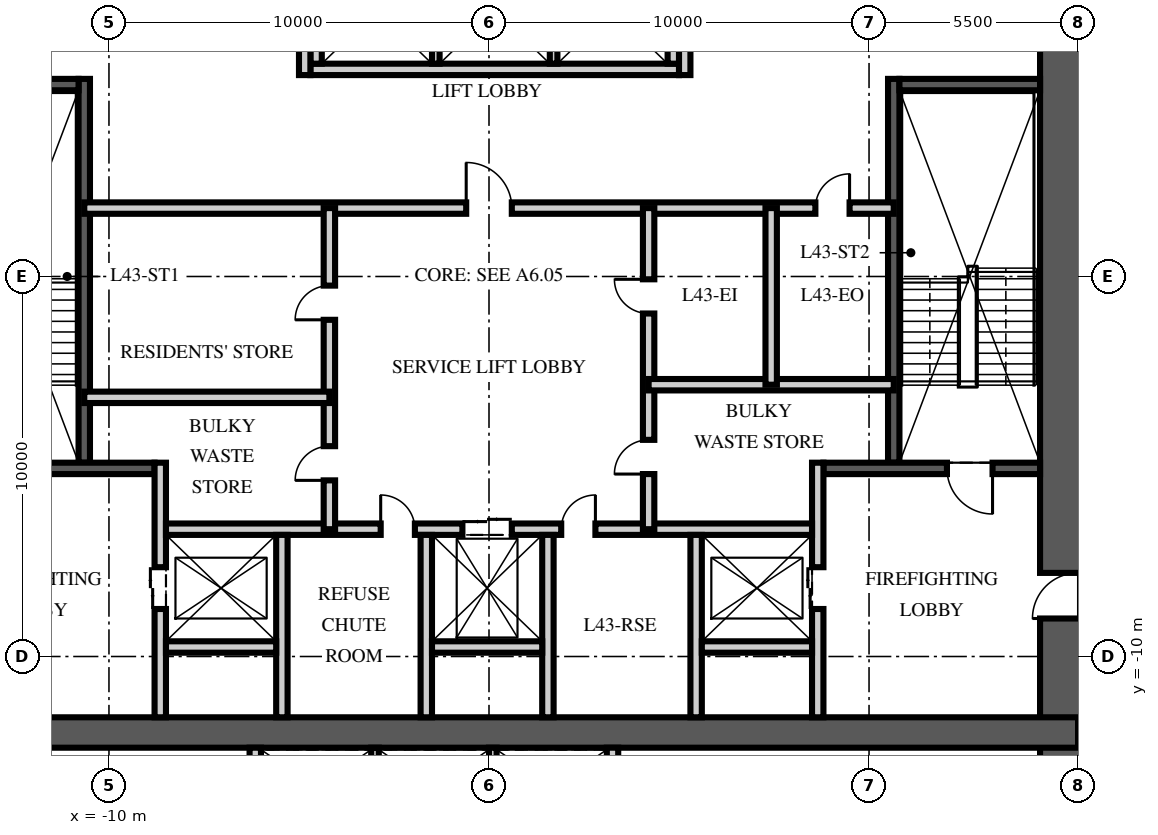
"""IFC4 building model, lengths in metres.
Left out: names, types, materials, properties, quantities, classifications, styles, units other than length and angle.
Written with IfcOpenShell. Run it as: python <this file> out.ifc"""

import sys

from ifc_helpers import new_model, si_unit, direction, frame, frame_2d, origin, place, context, subcontext, project, spatial, rectangle, extrude, element, fill, save


model = new_model("IFC4")
c1 = context("Model", 3, precision=1e-05, world=origin(), true_north=direction((0.0, 1.0)))
c2 = subcontext(c1, "Body", "Model", "MODEL_VIEW")
j1 = project(units=[si_unit("LENGTHUNIT", "METRE"), si_unit("PLANEANGLEUNIT", "RADIAN")], contexts=[c1])
p1 = place(None, origin())
s1 = spatial("IfcSite", under=j1, at=p1, CompositionType="ELEMENT")
p2 = place(p1, origin())
s2 = spatial("IfcBuilding", under=s1, at=p2, CompositionType="ELEMENT")
p3 = place(p2, frame((0.0, 0.0, 171.0)))
s3 = spatial("IfcBuildingStorey", under=s2, at=p3, CompositionType="ELEMENT", Elevation=171.0)
p4 = place(p3, frame((15.5, -15.5, -0.25), z_axis=(0.0, 0.0, 1.0), x_axis=(0.0, 1.0, 0.0)))
e1 = element("IfcWall", 1, at=p4, inside=s3, PredefinedType="SHEAR", context=c2, shape_type="SweptSolid", body=[
    extrude(rectangle(XDim=31.0, YDim=2.0, at=frame_2d((15.5, 0.0))), origin(), (0.0, 0.0, 1.0), 3.75),
])
p5 = place(p4, frame((6.5, 0.0, 0.25)))
e2 = element("IfcOpeningElement", 2, at=p5, cuts=e1, PredefinedType="OPENING", context=c2, shape_type="SweptSolid", body=[
    extrude(rectangle(XDim=1.2, YDim=2.1, at=frame_2d((0.6, 1.05))), frame((0.0, 1.01, 0.0), z_axis=(0.0, -1.0, 0.0), x_axis=(1.0, 0.0, 0.0)), (0.0, 0.0, 1.0), 2.02),
])
p6 = place(p4, frame((23.0, 0.0, 0.25)))
e3 = element("IfcOpeningElement", 3, at=p6, cuts=e1, PredefinedType="OPENING", context=c2, shape_type="SweptSolid", body=[
    extrude(rectangle(XDim=1.8, YDim=2.1, at=frame_2d((0.9, 1.05))), frame((0.0, 1.01, 0.0), z_axis=(0.0, -1.0, 0.0), x_axis=(1.0, 0.0, 0.0)), (0.0, 0.0, 1.0), 2.02),
])
p7 = place(p3, frame((-15.5, -12.0, -0.25), z_axis=(0.0, 0.0, 1.0), x_axis=(1.0, 0.0, 0.0)))
e4 = element("IfcWall", 4, at=p7, inside=s3, PredefinedType="SHEAR", context=c2, shape_type="SweptSolid", body=[
    extrude(rectangle(XDim=31.0, YDim=0.8, at=frame_2d((15.5, 0.0))), origin(), (0.0, 0.0, 1.0), 3.75),
])
p8 = place(p3, frame((-10.65, -4.9, 0.0), z_axis=(0.0, 0.0, 1.0), x_axis=(0.0, 1.0, 0.0)))
e5 = element("IfcWall", 5, at=p8, inside=s3, PredefinedType="SOLIDWALL", context=c2, shape_type="SweptSolid", body=[
    extrude(rectangle(XDim=10.1, YDim=0.3, at=frame_2d((5.05, 0.0))), origin(), (0.0, 0.0, 1.0), 3.5),
])
p9 = place(p3, frame((-14.5, -5.05, 0.0), z_axis=(0.0, 0.0, 1.0), x_axis=(1.0, 0.0, 0.0)))
e6 = element("IfcWall", 6, at=p9, inside=s3, PredefinedType="SOLIDWALL", context=c2, shape_type="SweptSolid", body=[
    extrude(rectangle(XDim=5.7, YDim=0.3, at=frame_2d((2.85, 0.0))), origin(), (0.0, 0.0, 1.0), 3.5),
])
p10 = place(p9, frame((1.25, 0.0, 0.0)))
e7 = element("IfcOpeningElement", 7, at=p10, cuts=e6, PredefinedType="OPENING", context=c2, shape_type="SweptSolid", body=[
    extrude(rectangle(XDim=1.2, YDim=2.1, at=frame_2d((0.6, 1.05))), frame((0.0, 0.16, 0.0), z_axis=(0.0, -1.0, 0.0), x_axis=(1.0, 0.0, 0.0)), (0.0, 0.0, 1.0), 0.32),
])
p11 = place(p3, frame((-14.5, 5.05, 0.0), z_axis=(0.0, 0.0, 1.0), x_axis=(1.0, 0.0, 0.0)))
e8 = element("IfcWall", 8, at=p11, inside=s3, PredefinedType="SOLIDWALL", context=c2, shape_type="SweptSolid", body=[
    extrude(rectangle(XDim=3.7, YDim=0.3, at=frame_2d((1.85, 0.0))), origin(), (0.0, 0.0, 1.0), 3.5),
])
p12 = place(p3, frame((-8.65, -11.6, 0.0), z_axis=(0.0, 0.0, 1.0), x_axis=(0.0, 1.0, 0.0)))
e9 = element("IfcWall", 9, at=p12, inside=s3, PredefinedType="PARTITIONING", context=c2, shape_type="SweptSolid", body=[
    extrude(rectangle(XDim=6.7, YDim=0.3, at=frame_2d((3.35, 0.0))), origin(), (0.0, 0.0, 1.0), 3.5),
])
p13 = place(p12, frame((2.85, 0.0, 0.0)))
e10 = element("IfcOpeningElement", 10, at=p13, cuts=e9, PredefinedType="OPENING", context=c2, shape_type="SweptSolid", body=[
    extrude(rectangle(XDim=1.1, YDim=2.1, at=frame_2d((0.55, 1.05))), frame((0.0, 0.16, 0.0), z_axis=(0.0, -1.0, 0.0), x_axis=(1.0, 0.0, 0.0)), (0.0, 0.0, 1.0), 0.32),
])
p14 = place(p3, frame((10.65, -4.9, 0.0), z_axis=(0.0, 0.0, 1.0), x_axis=(0.0, 1.0, 0.0)))
e11 = element("IfcWall", 11, at=p14, inside=s3, PredefinedType="SOLIDWALL", context=c2, shape_type="SweptSolid", body=[
    extrude(rectangle(XDim=10.1, YDim=0.3, at=frame_2d((5.05, 0.0))), origin(), (0.0, 0.0, 1.0), 3.5),
])
p15 = place(p3, frame((14.5, -5.05, 0.0), z_axis=(0.0, 0.0, 1.0), x_axis=(-1.0, 0.0, 0.0)))
e12 = element("IfcWall", 12, at=p15, inside=s3, PredefinedType="SOLIDWALL", context=c2, shape_type="SweptSolid", body=[
    extrude(rectangle(XDim=5.7, YDim=0.3, at=frame_2d((2.85, 0.0))), origin(), (0.0, 0.0, 1.0), 3.5),
])
p16 = place(p15, frame((1.25, 0.0, 0.0)))
e13 = element("IfcOpeningElement", 13, at=p16, cuts=e12, PredefinedType="OPENING", context=c2, shape_type="SweptSolid", body=[
    extrude(rectangle(XDim=1.2, YDim=2.1, at=frame_2d((0.6, 1.05))), frame((0.0, 0.16, 0.0), z_axis=(0.0, -1.0, 0.0), x_axis=(1.0, 0.0, 0.0)), (0.0, 0.0, 1.0), 0.32),
])
p17 = place(p3, frame((14.5, 5.05, 0.0), z_axis=(0.0, 0.0, 1.0), x_axis=(-1.0, 0.0, 0.0)))
e14 = element("IfcWall", 14, at=p17, inside=s3, PredefinedType="SOLIDWALL", context=c2, shape_type="SweptSolid", body=[
    extrude(rectangle(XDim=3.7, YDim=0.3, at=frame_2d((1.85, 0.0))), origin(), (0.0, 0.0, 1.0), 3.5),
])
p18 = place(p3, frame((8.65, -11.6, 0.0), z_axis=(0.0, 0.0, 1.0), x_axis=(0.0, 1.0, 0.0)))
e15 = element("IfcWall", 15, at=p18, inside=s3, PredefinedType="PARTITIONING", context=c2, shape_type="SweptSolid", body=[
    extrude(rectangle(XDim=6.7, YDim=0.3, at=frame_2d((3.35, 0.0))), origin(), (0.0, 0.0, 1.0), 3.5),
])
p19 = place(p18, frame((2.85, 0.0, 0.0)))
e16 = element("IfcOpeningElement", 16, at=p19, cuts=e15, PredefinedType="OPENING", context=c2, shape_type="SweptSolid", body=[
    extrude(rectangle(XDim=1.1, YDim=2.1, at=frame_2d((0.55, 1.05))), frame((0.0, 0.16, 0.0), z_axis=(0.0, -1.0, 0.0), x_axis=(1.0, 0.0, 0.0)), (0.0, 0.0, 1.0), 0.32),
])
p20 = place(p3, frame((-8.5, -6.65, 0.0), z_axis=(0.0, 0.0, 1.0), x_axis=(1.0, 0.0, 0.0)))
e17 = element("IfcWall", 17, at=p20, inside=s3, PredefinedType="PARTITIONING", context=c2, shape_type="SweptSolid", body=[
    extrude(rectangle(XDim=17.0, YDim=0.3, at=frame_2d((8.5, 0.0))), origin(), (0.0, 0.0, 1.0), 3.5),
])
p21 = place(p20, frame((7.8, 0.0, 0.0)))
e18 = element("IfcOpeningElement", 18, at=p21, cuts=e17, PredefinedType="OPENING", context=c2, shape_type="SweptSolid", body=[
    extrude(rectangle(XDim=1.3, YDim=2.4, at=frame_2d((0.65, 1.2))), frame((0.0, 0.16, 0.0), z_axis=(0.0, -1.0, 0.0), x_axis=(1.0, 0.0, 0.0)), (0.0, 0.0, 1.0), 0.32),
])
p22 = place(p20, frame((5.65, 0.0, 0.0)))
e19 = element("IfcOpeningElement", 19, at=p22, cuts=e17, PredefinedType="OPENING", context=c2, shape_type="SweptSolid", body=[
    extrude(rectangle(XDim=0.9, YDim=2.1, at=frame_2d((0.45, 1.05))), frame((0.0, 0.16, 0.0), z_axis=(0.0, -1.0, 0.0), x_axis=(1.0, 0.0, 0.0)), (0.0, 0.0, 1.0), 0.32),
])
p23 = place(p20, frame((10.4, 0.0, 0.0)))
e20 = element("IfcOpeningElement", 20, at=p23, cuts=e17, PredefinedType="OPENING", context=c2, shape_type="SweptSolid", body=[
    extrude(rectangle(XDim=0.9, YDim=2.1, at=frame_2d((0.45, 1.05))), frame((0.0, 0.16, 0.0), z_axis=(0.0, -1.0, 0.0), x_axis=(1.0, 0.0, 0.0)), (0.0, 0.0, 1.0), 0.32),
])
for number, where, z_axis, x_axis in (
    (21, (-5.45, -11.6, 0.0), (0.0, 0.0, 1.0), (0.0, 1.0, 0.0)),
    (22, (-1.65, -11.6, 0.0), (0.0, 0.0, 1.0), (0.0, 1.0, 0.0)),
    (23, (1.55, -11.6, 0.0), (0.0, 0.0, 1.0), (0.0, 1.0, 0.0)),
    (24, (5.45, -11.6, 0.0), (0.0, 0.0, 1.0), (0.0, 1.0, 0.0)),
):
    element("IfcWall", number, at=place(p3, frame(where, z_axis=z_axis, x_axis=x_axis)), inside=s3, PredefinedType="PARTITIONING", context=c2, shape_type="SweptSolid", body=[
        extrude(rectangle(XDim=4.8, YDim=0.3, at=frame_2d((2.4, 0.0))), origin(), (0.0, 0.0, 1.0), 3.5),
    ])
for number, where, z_axis, x_axis in (
    (25, (-8.5, -9.75, 0.0), (0.0, 0.0, 1.0), (1.0, 0.0, 0.0)),
    (26, (-1.5, -9.75, 0.0), (0.0, 0.0, 1.0), (1.0, 0.0, 0.0)),
    (27, (5.6, -9.75, 0.0), (0.0, 0.0, 1.0), (1.0, 0.0, 0.0)),
):
    element("IfcWall", number, at=place(p3, frame(where, z_axis=z_axis, x_axis=x_axis)), inside=s3, PredefinedType="PARTITIONING", context=c2, shape_type="SweptSolid", body=[
        extrude(rectangle(XDim=2.9, YDim=0.3, at=frame_2d((1.45, 0.0))), origin(), (0.0, 0.0, 1.0), 3.5),
    ])
p24 = place(p3, frame((-4.7, 5.45, 0.0), z_axis=(0.0, 0.0, 1.0), x_axis=(1.0, 0.0, 0.0)))
e28 = element("IfcWall", 28, at=p24, inside=s3, PredefinedType="PARTITIONING", context=c2, shape_type="SweptSolid", body=[
    extrude(rectangle(XDim=9.7, YDim=0.3, at=frame_2d((4.85, 0.0))), origin(), (0.0, 0.0, 1.0), 3.5),
])
for number, where, z_axis, x_axis in (
    (29, (-4.55, 5.6, 0.0), (0.0, 0.0, 1.0), (0.0, 1.0, 0.0)),
    (30, (4.85, 5.6, 0.0), (0.0, 0.0, 1.0), (0.0, 1.0, 0.0)),
):
    element("IfcWall", number, at=place(p3, frame(where, z_axis=z_axis, x_axis=x_axis)), inside=s3, PredefinedType="PARTITIONING", context=c2, shape_type="SweptSolid", body=[
        extrude(rectangle(XDim=2.8, YDim=0.3, at=frame_2d((1.4, 0.0))), origin(), (0.0, 0.0, 1.0), 3.5),
    ])
for number, where, z_axis, x_axis in (
    (31, (-1.4, 5.6, 0.0), (0.0, 0.0, 1.0), (0.0, 1.0, 0.0)),
    (32, (1.7, 5.6, 0.0), (0.0, 0.0, 1.0), (0.0, 1.0, 0.0)),
):
    element("IfcWall", number, at=place(p3, frame(where, z_axis=z_axis, x_axis=x_axis)), inside=s3, PredefinedType="PARTITIONING", context=c2, shape_type="SweptSolid", body=[
        extrude(rectangle(XDim=2.8, YDim=0.2, at=frame_2d((1.4, 0.0))), origin(), (0.0, 0.0, 1.0), 3.5),
    ])
for number, where, z_axis, x_axis in (
    (33, (-6.15, -14.5, 0.0), (0.0, 0.0, 1.0), (0.0, 1.0, 0.0)),
    (34, (3.25, -14.5, 0.0), (0.0, 0.0, 1.0), (0.0, 1.0, 0.0)),
):
    element("IfcWall", number, at=place(p3, frame(where, z_axis=z_axis, x_axis=x_axis)), inside=s3, PredefinedType="PARTITIONING", context=c2, shape_type="SweptSolid", body=[
        extrude(rectangle(XDim=2.1, YDim=0.3, at=frame_2d((1.05, 0.0))), origin(), (0.0, 0.0, 1.0), 3.5),
    ])
for number, where, z_axis, x_axis in (
    (35, (-3.0, -14.5, 0.0), (0.0, 0.0, 1.0), (0.0, 1.0, 0.0)),
    (36, (0.1, -14.5, 0.0), (0.0, 0.0, 1.0), (0.0, 1.0, 0.0)),
):
    element("IfcWall", number, at=place(p3, frame(where, z_axis=z_axis, x_axis=x_axis)), inside=s3, PredefinedType="PARTITIONING", context=c2, shape_type="SweptSolid", body=[
        extrude(rectangle(XDim=2.1, YDim=0.2, at=frame_2d((1.05, 0.0))), origin(), (0.0, 0.0, 1.0), 3.5),
    ])
p25 = place(p3, frame((-10.65, 1.8, 0.0), z_axis=(0.0, 0.0, 1.0), x_axis=(1.0, 0.0, 0.0)))
e37 = element("IfcWall", 37, at=p25, inside=s3, PredefinedType="PARTITIONING", context=c2, shape_type="SweptSolid", body=[
    extrude(rectangle(XDim=21.3, YDim=0.3, at=frame_2d((10.65, 0.0))), origin(), (0.0, 0.0, 1.0), 3.5),
])
p26 = place(p25, frame((10.05, 0.0, 0.0)))
e38 = element("IfcOpeningElement", 38, at=p26, cuts=e37, PredefinedType="OPENING", context=c2, shape_type="SweptSolid", body=[
    extrude(rectangle(XDim=1.2, YDim=2.1, at=frame_2d((0.6, 1.05))), frame((0.0, 0.16, 0.0), z_axis=(0.0, -1.0, 0.0), x_axis=(1.0, 0.0, 0.0)), (0.0, 0.0, 1.0), 0.32),
])
p27 = place(p25, frame((19.238, 0.0, 0.0)))
e39 = element("IfcOpeningElement", 39, at=p27, cuts=e37, PredefinedType="OPENING", context=c2, shape_type="SweptSolid", body=[
    extrude(rectangle(XDim=0.9, YDim=2.1, at=frame_2d((0.45, 1.05))), frame((0.0, 0.16, 0.0), z_axis=(0.0, -1.0, 0.0), x_axis=(1.0, 0.0, 0.0)), (0.0, 0.0, 1.0), 0.32),
])
p28 = place(p3, frame((-4.2, -6.65, 0.0), z_axis=(0.0, 0.0, 1.0), x_axis=(0.0, 1.0, 0.0)))
e40 = element("IfcWall", 40, at=p28, inside=s3, PredefinedType="PARTITIONING", context=c2, shape_type="SweptSolid", body=[
    extrude(rectangle(XDim=8.45, YDim=0.3, at=frame_2d((4.225, 0.0))), origin(), (0.0, 0.0, 1.0), 3.5),
])
p29 = place(p28, frame((1.285, 0.0, 0.0)))
e41 = element("IfcOpeningElement", 41, at=p29, cuts=e40, PredefinedType="OPENING", context=c2, shape_type="SweptSolid", body=[
    extrude(rectangle(XDim=0.9, YDim=2.1, at=frame_2d((0.45, 1.05))), frame((0.0, 0.16, 0.0), z_axis=(0.0, -1.0, 0.0), x_axis=(1.0, 0.0, 0.0)), (0.0, 0.0, 1.0), 0.32),
])
p30 = place(p28, frame((5.51, 0.0, 0.0)))
e42 = element("IfcOpeningElement", 42, at=p30, cuts=e40, PredefinedType="OPENING", context=c2, shape_type="SweptSolid", body=[
    extrude(rectangle(XDim=0.9, YDim=2.1, at=frame_2d((0.45, 1.05))), frame((0.0, 0.16, 0.0), z_axis=(0.0, -1.0, 0.0), x_axis=(1.0, 0.0, 0.0)), (0.0, 0.0, 1.0), 0.32),
])
p31 = place(p3, frame((4.2, -6.65, 0.0), z_axis=(0.0, 0.0, 1.0), x_axis=(0.0, 1.0, 0.0)))
e43 = element("IfcWall", 43, at=p31, inside=s3, PredefinedType="PARTITIONING", context=c2, shape_type="SweptSolid", body=[
    extrude(rectangle(XDim=8.45, YDim=0.3, at=frame_2d((4.225, 0.0))), origin(), (0.0, 0.0, 1.0), 3.5),
])
p32 = place(p31, frame((1.451, 0.0, 0.0)))
e44 = element("IfcOpeningElement", 44, at=p32, cuts=e43, PredefinedType="OPENING", context=c2, shape_type="SweptSolid", body=[
    extrude(rectangle(XDim=0.9, YDim=2.1, at=frame_2d((0.45, 1.05))), frame((0.0, 0.16, 0.0), z_axis=(0.0, -1.0, 0.0), x_axis=(1.0, 0.0, 0.0)), (0.0, 0.0, 1.0), 0.32),
])
p33 = place(p31, frame((5.676, 0.0, 0.0)))
e45 = element("IfcOpeningElement", 45, at=p33, cuts=e43, PredefinedType="OPENING", context=c2, shape_type="SweptSolid", body=[
    extrude(rectangle(XDim=0.9, YDim=2.1, at=frame_2d((0.45, 1.05))), frame((0.0, 0.16, 0.0), z_axis=(0.0, -1.0, 0.0), x_axis=(1.0, 0.0, 0.0)), (0.0, 0.0, 1.0), 0.32),
])
for number, where, z_axis, x_axis in (
    (46, (-10.65, -3.18, 0.0), (0.0, 0.0, 1.0), (1.0, 0.0, 0.0)),
    (47, (10.65, -2.848, 0.0), (0.0, 0.0, 1.0), (-1.0, 0.0, 0.0)),
):
    element("IfcWall", number, at=place(p3, frame(where, z_axis=z_axis, x_axis=x_axis)), inside=s3, PredefinedType="PARTITIONING", context=c2, shape_type="SweptSolid", body=[
        extrude(rectangle(XDim=6.45, YDim=0.3, at=frame_2d((3.225, 0.0))), origin(), (0.0, 0.0, 1.0), 3.5),
    ])
p34 = place(p3, frame((7.425, -2.848, 0.0), z_axis=(0.0, 0.0, 1.0), x_axis=(0.0, 1.0, 0.0)))
e48 = element("IfcWall", 48, at=p34, inside=s3, PredefinedType="PARTITIONING", context=c2, shape_type="SweptSolid", body=[
    extrude(rectangle(XDim=4.648, YDim=0.3, at=frame_2d((2.324, 0.0))), origin(), (0.0, 0.0, 1.0), 3.5),
])
p35 = place(p3, frame((-4.85, 5.3, 0.0), z_axis=(0.0, 0.0, 1.0), x_axis=(0.0, 1.0, 0.0)))
e49 = element("IfcWall", 49, at=p35, inside=s3, PredefinedType="PARTITIONING", context=c2, shape_type="SweptSolid", body=[
    extrude(rectangle(XDim=6.3, YDim=0.3, at=frame_2d((3.15, 0.0))), origin(), (0.0, 0.0, 1.0), 3.5),
])
p36 = place(p35, frame((4.35, 0.0, 0.0)))
e50 = element("IfcOpeningElement", 50, at=p36, cuts=e49, PredefinedType="OPENING", context=c2, shape_type="SweptSolid", body=[
    extrude(rectangle(XDim=0.9, YDim=2.1, at=frame_2d((0.45, 1.05))), frame((0.0, 0.16, 0.0), z_axis=(0.0, -1.0, 0.0), x_axis=(1.0, 0.0, 0.0)), (0.0, 0.0, 1.0), 0.32),
])
p37 = place(p3, frame((5.15, 5.3, 0.0), z_axis=(0.0, 0.0, 1.0), x_axis=(0.0, 1.0, 0.0)))
e51 = element("IfcWall", 51, at=p37, inside=s3, PredefinedType="PARTITIONING", context=c2, shape_type="SweptSolid", body=[
    extrude(rectangle(XDim=6.3, YDim=0.3, at=frame_2d((3.15, 0.0))), origin(), (0.0, 0.0, 1.0), 3.5),
])
p38 = place(p37, frame((4.35, 0.0, 0.0)))
e52 = element("IfcOpeningElement", 52, at=p38, cuts=e51, PredefinedType="OPENING", context=c2, shape_type="SweptSolid", body=[
    extrude(rectangle(XDim=0.9, YDim=2.1, at=frame_2d((0.45, 1.05))), frame((0.0, 0.16, 0.0), z_axis=(0.0, -1.0, 0.0), x_axis=(1.0, 0.0, 0.0)), (0.0, 0.0, 1.0), 0.32),
])
p39 = place(p16, origin())
e53 = element("IfcDoor", 53, at=p39, inside=s3, OperationType="SINGLE_SWING_LEFT", PredefinedType="DOOR", context=c2, shape_type="SweptSolid", body=[
    extrude(rectangle(XDim=1.2, YDim=2.1, at=frame_2d((0.6, 1.05))), frame((0.0, 0.025, 0.0), z_axis=(0.0, -1.0, 0.0), x_axis=(1.0, 0.0, 0.0)), (0.0, 0.0, 1.0), 0.05),
])
fill(e13, e53)
p40 = place(p5, origin())
e54 = element("IfcDoor", 54, at=p40, inside=s3, OperationType="SINGLE_SWING_LEFT", PredefinedType="DOOR", context=c2, shape_type="SweptSolid", body=[
    extrude(rectangle(XDim=1.2, YDim=2.1, at=frame_2d((0.6, 1.05))), frame((0.0, 0.025, 0.0), z_axis=(0.0, -1.0, 0.0), x_axis=(1.0, 0.0, 0.0)), (0.0, 0.0, 1.0), 0.05),
])
fill(e2, e54)
p41 = place(p13, origin())
e55 = element("IfcDoor", 55, at=p41, inside=s3, OperationType="DOUBLE_DOOR_SLIDING", PredefinedType="DOOR", context=c2, shape_type="SweptSolid", body=[
    extrude(rectangle(XDim=1.1, YDim=2.1, at=frame_2d((0.55, 1.05))), frame((0.0, 0.025, 0.0), z_axis=(0.0, -1.0, 0.0), x_axis=(1.0, 0.0, 0.0)), (0.0, 0.0, 1.0), 0.05),
])
fill(e10, e55)
p42 = place(p19, origin())
e56 = element("IfcDoor", 56, at=p42, inside=s3, OperationType="DOUBLE_DOOR_SLIDING", PredefinedType="DOOR", context=c2, shape_type="SweptSolid", body=[
    extrude(rectangle(XDim=1.1, YDim=2.1, at=frame_2d((0.55, 1.05))), frame((0.0, 0.025, 0.0), z_axis=(0.0, -1.0, 0.0), x_axis=(1.0, 0.0, 0.0)), (0.0, 0.0, 1.0), 0.05),
])
fill(e16, e56)
p43 = place(p21, origin())
e57 = element("IfcDoor", 57, at=p43, inside=s3, OperationType="DOUBLE_DOOR_SLIDING", PredefinedType="DOOR", context=c2, shape_type="SweptSolid", body=[
    extrude(rectangle(XDim=1.3, YDim=2.4, at=frame_2d((0.65, 1.2))), frame((0.0, 0.025, 0.0), z_axis=(0.0, -1.0, 0.0), x_axis=(1.0, 0.0, 0.0)), (0.0, 0.0, 1.0), 0.05),
])
fill(e18, e57)
p44 = place(p26, origin())
e58 = element("IfcDoor", 58, at=p44, inside=s3, OperationType="SINGLE_SWING_LEFT", PredefinedType="DOOR", context=c2, shape_type="SweptSolid", body=[
    extrude(rectangle(XDim=1.2, YDim=2.1, at=frame_2d((0.6, 1.05))), frame((0.0, 0.025, 0.0), z_axis=(0.0, -1.0, 0.0), x_axis=(1.0, 0.0, 0.0)), (0.0, 0.0, 1.0), 0.05),
])
fill(e38, e58)
p45 = place(p22, origin())
e59 = element("IfcDoor", 59, at=p45, inside=s3, OperationType="SINGLE_SWING_LEFT", PredefinedType="DOOR", context=c2, shape_type="SweptSolid", body=[
    extrude(rectangle(XDim=0.9, YDim=2.1, at=frame_2d((0.45, 1.05))), frame((0.0, 0.025, 0.0), z_axis=(0.0, -1.0, 0.0), x_axis=(1.0, 0.0, 0.0)), (0.0, 0.0, 1.0), 0.05),
])
fill(e19, e59)
p46 = place(p23, origin())
e60 = element("IfcDoor", 60, at=p46, inside=s3, OperationType="SINGLE_SWING_RIGHT", PredefinedType="DOOR", context=c2, shape_type="SweptSolid", body=[
    extrude(rectangle(XDim=0.9, YDim=2.1, at=frame_2d((0.45, 1.05))), frame((0.0, 0.025, 0.0), z_axis=(0.0, -1.0, 0.0), x_axis=(1.0, 0.0, 0.0)), (0.0, 0.0, 1.0), 0.05),
])
fill(e20, e60)
p47 = place(p29, origin())
e61 = element("IfcDoor", 61, at=p47, inside=s3, OperationType="SINGLE_SWING_LEFT", PredefinedType="DOOR", context=c2, shape_type="SweptSolid", body=[
    extrude(rectangle(XDim=0.9, YDim=2.1, at=frame_2d((0.45, 1.05))), frame((0.0, 0.025, 0.0), z_axis=(0.0, -1.0, 0.0), x_axis=(1.0, 0.0, 0.0)), (0.0, 0.0, 1.0), 0.05),
])
fill(e41, e61)
p48 = place(p30, origin())
e62 = element("IfcDoor", 62, at=p48, inside=s3, OperationType="SINGLE_SWING_LEFT", PredefinedType="DOOR", context=c2, shape_type="SweptSolid", body=[
    extrude(rectangle(XDim=0.9, YDim=2.1, at=frame_2d((0.45, 1.05))), frame((0.0, 0.025, 0.0), z_axis=(0.0, -1.0, 0.0), x_axis=(1.0, 0.0, 0.0)), (0.0, 0.0, 1.0), 0.05),
])
fill(e42, e62)
p49 = place(p32, origin())
e63 = element("IfcDoor", 63, at=p49, inside=s3, OperationType="SINGLE_SWING_LEFT", PredefinedType="DOOR", context=c2, shape_type="SweptSolid", body=[
    extrude(rectangle(XDim=0.9, YDim=2.1, at=frame_2d((0.45, 1.05))), frame((0.0, 0.025, 0.0), z_axis=(0.0, -1.0, 0.0), x_axis=(1.0, 0.0, 0.0)), (0.0, 0.0, 1.0), 0.05),
])
fill(e44, e63)
p50 = place(p33, origin())
e64 = element("IfcDoor", 64, at=p50, inside=s3, OperationType="SINGLE_SWING_RIGHT", PredefinedType="DOOR", context=c2, shape_type="SweptSolid", body=[
    extrude(rectangle(XDim=0.9, YDim=2.1, at=frame_2d((0.45, 1.05))), frame((0.0, 0.025, 0.0), z_axis=(0.0, -1.0, 0.0), x_axis=(1.0, 0.0, 0.0)), (0.0, 0.0, 1.0), 0.05),
])
fill(e45, e64)
p51 = place(p27, origin())
e65 = element("IfcDoor", 65, at=p51, inside=s3, OperationType="SINGLE_SWING_RIGHT", PredefinedType="DOOR", context=c2, shape_type="SweptSolid", body=[
    extrude(rectangle(XDim=0.9, YDim=2.1, at=frame_2d((0.45, 1.05))), frame((0.0, 0.025, 0.0), z_axis=(0.0, -1.0, 0.0), x_axis=(1.0, 0.0, 0.0)), (0.0, 0.0, 1.0), 0.05),
])
fill(e39, e65)
save(model, sys.argv[1])
